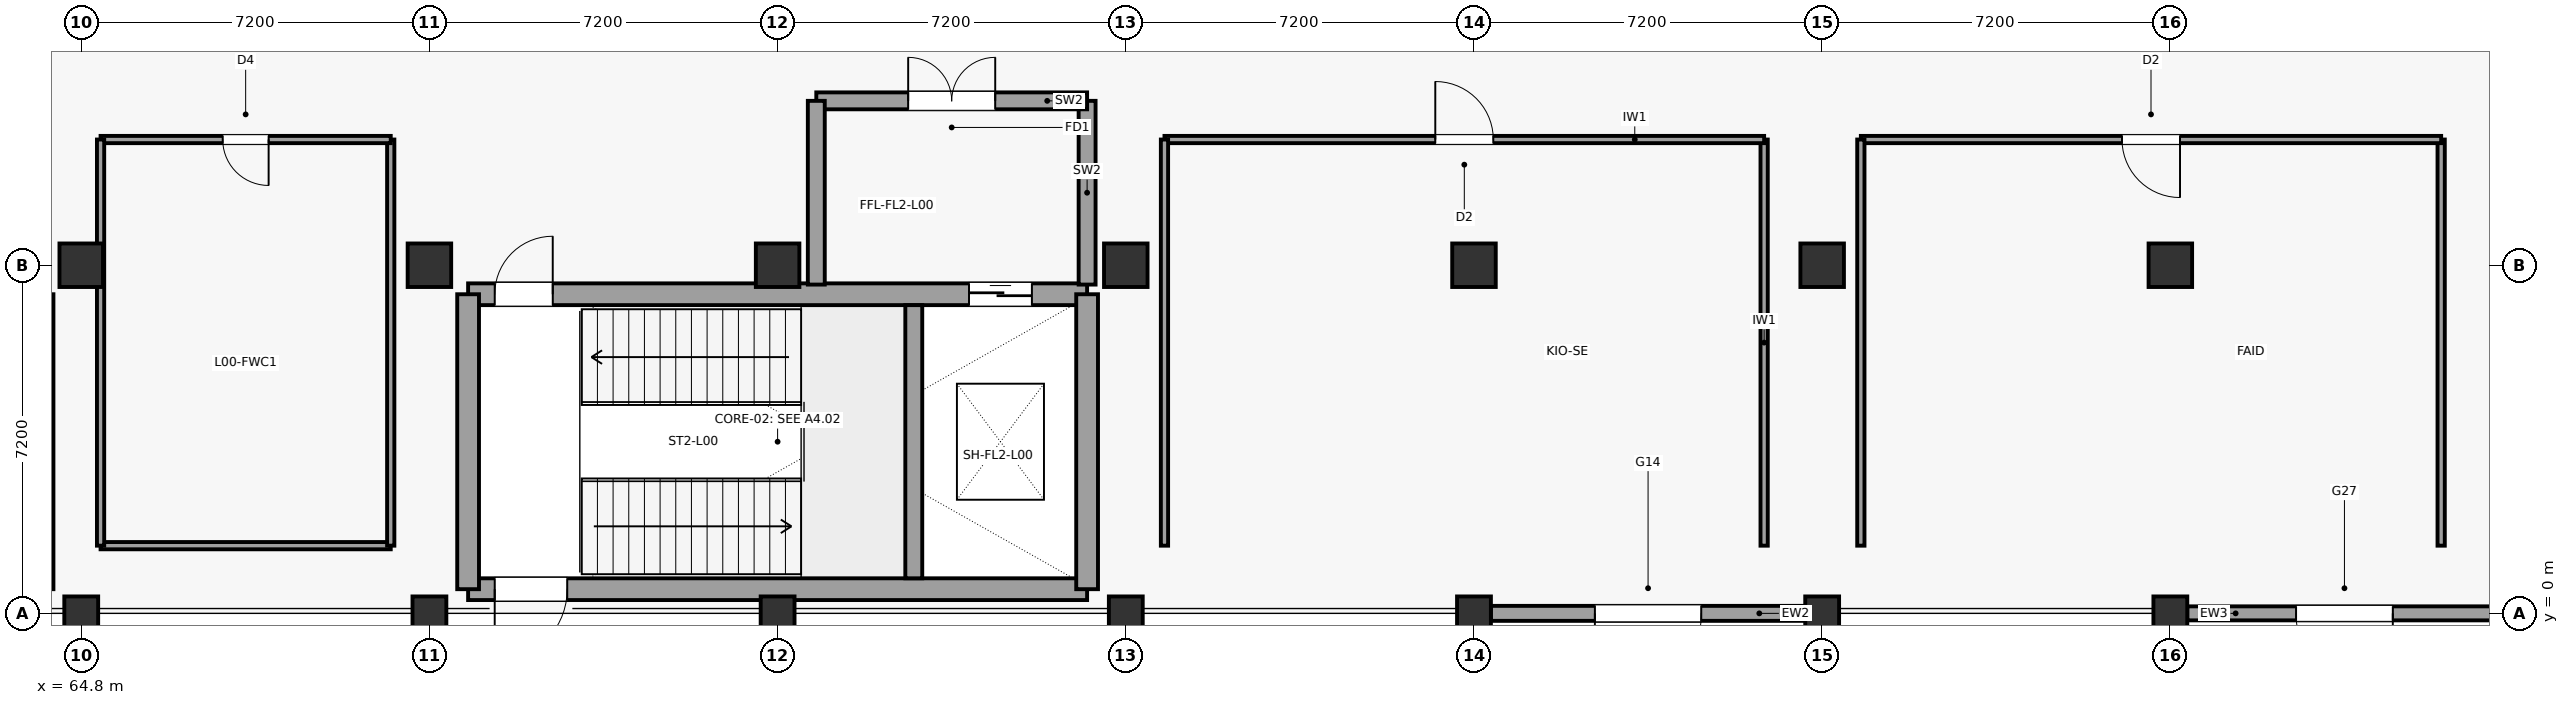
"""IFC4 building model, lengths in metres.
Left out: names, types, materials, properties, quantities, classifications, styles, units other than length and angle.
Written with IfcOpenShell. Run it as: python <this file> out.ifc"""

import sys

from ifc_helpers import new_model, si_unit, direction, frame, frame_2d, origin, origin_2d, place, context, subcontext, project, spatial, rectangle, extrude, element, fill, save


model = new_model("IFC4")
c1 = context("Model", 3, precision=1e-05, world=origin(), true_north=direction((0.0, 1.0)))
c2 = subcontext(c1, "Body", "Model", "MODEL_VIEW")
j1 = project(units=[si_unit("LENGTHUNIT", "METRE"), si_unit("PLANEANGLEUNIT", "RADIAN")], contexts=[c1])
p1 = place(None, origin())
s1 = spatial("IfcSite", under=j1, at=p1, CompositionType="ELEMENT")
p2 = place(p1, origin())
s2 = spatial("IfcBuilding", under=s1, at=p2, CompositionType="ELEMENT")
p3 = place(p2, origin())
s3 = spatial("IfcBuildingStorey", under=s2, at=p3, CompositionType="ELEMENT", Elevation=0.0)
p4 = place(p3, frame((64.8, 0.0, 0.0), z_axis=(0.0, 0.0, 1.0), x_axis=(1.0, 0.0, 0.0)))
e1 = element("IfcColumn", 1, at=p4, inside=s3, PredefinedType="COLUMN", context=c2, shape_type="SweptSolid", body=[
    extrude(rectangle(XDim=0.7, YDim=0.7, at=origin_2d()), origin(), (0.0, 0.0, 1.0), 5.4),
])
p5 = place(p3, frame((64.8, 7.2, 0.0), z_axis=(0.0, 0.0, 1.0), x_axis=(1.0, 0.0, 0.0)))
e2 = element("IfcColumn", 2, at=p5, inside=s3, PredefinedType="COLUMN", context=c2, shape_type="SweptSolid", body=[
    extrude(rectangle(XDim=0.9, YDim=0.9, at=origin_2d()), origin(), (0.0, 0.0, 1.0), 5.4),
])
p6 = place(p3, frame((72.0, 0.0, 0.0), z_axis=(0.0, 0.0, 1.0), x_axis=(1.0, 0.0, 0.0)))
e3 = element("IfcColumn", 3, at=p6, inside=s3, PredefinedType="COLUMN", context=c2, shape_type="SweptSolid", body=[
    extrude(rectangle(XDim=0.7, YDim=0.7, at=origin_2d()), origin(), (0.0, 0.0, 1.0), 5.4),
])
p7 = place(p3, frame((72.0, 7.2, 0.0), z_axis=(0.0, 0.0, 1.0), x_axis=(1.0, 0.0, 0.0)))
e4 = element("IfcColumn", 4, at=p7, inside=s3, PredefinedType="COLUMN", context=c2, shape_type="SweptSolid", body=[
    extrude(rectangle(XDim=0.9, YDim=0.9, at=origin_2d()), origin(), (0.0, 0.0, 1.0), 5.4),
])
p8 = place(p3, frame((79.2, 0.0, 0.0), z_axis=(0.0, 0.0, 1.0), x_axis=(1.0, 0.0, 0.0)))
e5 = element("IfcColumn", 5, at=p8, inside=s3, PredefinedType="COLUMN", context=c2, shape_type="SweptSolid", body=[
    extrude(rectangle(XDim=0.7, YDim=0.7, at=origin_2d()), origin(), (0.0, 0.0, 1.0), 5.4),
])
p9 = place(p3, frame((79.2, 7.2, 0.0), z_axis=(0.0, 0.0, 1.0), x_axis=(1.0, 0.0, 0.0)))
e6 = element("IfcColumn", 6, at=p9, inside=s3, PredefinedType="COLUMN", context=c2, shape_type="SweptSolid", body=[
    extrude(rectangle(XDim=0.9, YDim=0.9, at=origin_2d()), origin(), (0.0, 0.0, 1.0), 5.4),
])
p10 = place(p3, frame((86.4, 0.0, 0.0), z_axis=(0.0, 0.0, 1.0), x_axis=(1.0, 0.0, 0.0)))
e7 = element("IfcColumn", 7, at=p10, inside=s3, PredefinedType="COLUMN", context=c2, shape_type="SweptSolid", body=[
    extrude(rectangle(XDim=0.7, YDim=0.7, at=origin_2d()), origin(), (0.0, 0.0, 1.0), 5.4),
])
p11 = place(p3, frame((86.4, 7.2, 0.0), z_axis=(0.0, 0.0, 1.0), x_axis=(1.0, 0.0, 0.0)))
e8 = element("IfcColumn", 8, at=p11, inside=s3, PredefinedType="COLUMN", context=c2, shape_type="SweptSolid", body=[
    extrude(rectangle(XDim=0.9, YDim=0.9, at=origin_2d()), origin(), (0.0, 0.0, 1.0), 5.4),
])
p12 = place(p3, frame((93.6, 0.0, 0.0), z_axis=(0.0, 0.0, 1.0), x_axis=(1.0, 0.0, 0.0)))
e9 = element("IfcColumn", 9, at=p12, inside=s3, PredefinedType="COLUMN", context=c2, shape_type="SweptSolid", body=[
    extrude(rectangle(XDim=0.7, YDim=0.7, at=origin_2d()), origin(), (0.0, 0.0, 1.0), 5.4),
])
p13 = place(p3, frame((93.6, 7.2, 0.0), z_axis=(0.0, 0.0, 1.0), x_axis=(1.0, 0.0, 0.0)))
e10 = element("IfcColumn", 10, at=p13, inside=s3, PredefinedType="COLUMN", context=c2, shape_type="SweptSolid", body=[
    extrude(rectangle(XDim=0.9, YDim=0.9, at=origin_2d()), origin(), (0.0, 0.0, 1.0), 5.4),
])
p14 = place(p3, frame((100.8, 0.0, 0.0), z_axis=(0.0, 0.0, 1.0), x_axis=(1.0, 0.0, 0.0)))
e11 = element("IfcColumn", 11, at=p14, inside=s3, PredefinedType="COLUMN", context=c2, shape_type="SweptSolid", body=[
    extrude(rectangle(XDim=0.7, YDim=0.7, at=origin_2d()), origin(), (0.0, 0.0, 1.0), 5.4),
])
p15 = place(p3, frame((100.8, 7.2, 0.0), z_axis=(0.0, 0.0, 1.0), x_axis=(1.0, 0.0, 0.0)))
e12 = element("IfcColumn", 12, at=p15, inside=s3, PredefinedType="COLUMN", context=c2, shape_type="SweptSolid", body=[
    extrude(rectangle(XDim=0.9, YDim=0.9, at=origin_2d()), origin(), (0.0, 0.0, 1.0), 5.4),
])
p16 = place(p3, frame((108.0, 0.0, 0.0), z_axis=(0.0, 0.0, 1.0), x_axis=(1.0, 0.0, 0.0)))
e13 = element("IfcColumn", 13, at=p16, inside=s3, PredefinedType="COLUMN", context=c2, shape_type="SweptSolid", body=[
    extrude(rectangle(XDim=0.7, YDim=0.7, at=origin_2d()), origin(), (0.0, 0.0, 1.0), 5.4),
])
p17 = place(p3, frame((108.0, 7.2, 0.0), z_axis=(0.0, 0.0, 1.0), x_axis=(1.0, 0.0, 0.0)))
e14 = element("IfcColumn", 14, at=p17, inside=s3, PredefinedType="COLUMN", context=c2, shape_type="SweptSolid", body=[
    extrude(rectangle(XDim=0.9, YDim=0.9, at=origin_2d()), origin(), (0.0, 0.0, 1.0), 5.4),
])
p18 = place(p3, frame((72.8, 0.5, 0.0), z_axis=(0.0, 0.0, 1.0), x_axis=(1.0, 0.0, 0.0)))
e15 = element("IfcWall", 15, at=p18, inside=s3, PredefinedType="SHEAR", context=c2, shape_type="SweptSolid", body=[
    extrude(rectangle(XDim=12.8, YDim=0.45, at=frame_2d((6.4, 0.0))), origin(), (0.0, 0.0, 1.0), 5.06),
])
p19 = place(p18, frame((0.55, 0.0, 0.0)))
e16 = element("IfcOpeningElement", 16, at=p19, cuts=e15, PredefinedType="OPENING", context=c2, shape_type="SweptSolid", body=[
    extrude(rectangle(XDim=1.5, YDim=2.25, at=frame_2d((0.75, 1.125))), frame((0.0, 0.235, 0.0), z_axis=(0.0, -1.0, 0.0), x_axis=(1.0, 0.0, 0.0)), (0.0, 0.0, 1.0), 0.47),
])
p20 = place(p3, frame((72.8, 6.6, 0.0), z_axis=(0.0, 0.0, 1.0), x_axis=(1.0, 0.0, 0.0)))
e17 = element("IfcWall", 17, at=p20, inside=s3, PredefinedType="SHEAR", context=c2, shape_type="SweptSolid", body=[
    extrude(rectangle(XDim=12.8, YDim=0.45, at=frame_2d((6.4, 0.0))), origin(), (0.0, 0.0, 1.0), 5.06),
])
p21 = place(p20, frame((0.55, 0.0, 0.0)))
e18 = element("IfcOpeningElement", 18, at=p21, cuts=e17, PredefinedType="OPENING", context=c2, shape_type="SweptSolid", body=[
    extrude(rectangle(XDim=1.2, YDim=2.25, at=frame_2d((0.6, 1.125))), frame((0.0, 0.235, 0.0), z_axis=(0.0, -1.0, 0.0), x_axis=(1.0, 0.0, 0.0)), (0.0, 0.0, 1.0), 0.47),
])
p22 = place(p20, frame((10.358, 0.0, 0.0)))
e19 = element("IfcOpeningElement", 19, at=p22, cuts=e17, PredefinedType="OPENING", context=c2, shape_type="SweptSolid", body=[
    extrude(rectangle(XDim=1.3, YDim=2.25, at=frame_2d((0.65, 1.125))), frame((0.0, 0.235, 0.0), z_axis=(0.0, -1.0, 0.0), x_axis=(1.0, 0.0, 0.0)), (0.0, 0.0, 1.0), 0.47),
])
for number, where, z_axis, x_axis in (
    (20, (72.8, 0.5, 0.0), (0.0, 0.0, 1.0), (0.0, 1.0, 0.0)),
    (21, (85.6, 0.5, 0.0), (0.0, 0.0, 1.0), (0.0, 1.0, 0.0)),
):
    element("IfcWall", number, at=place(p3, frame(where, z_axis=z_axis, x_axis=x_axis)), inside=s3, PredefinedType="SHEAR", context=c2, shape_type="SweptSolid", body=[
        extrude(rectangle(XDim=6.1, YDim=0.45, at=frame_2d((3.05, 0.0))), origin(), (0.0, 0.0, 1.0), 5.06),
    ])
p23 = place(p3, frame((82.016, 0.725, 0.0), z_axis=(0.0, 0.0, 1.0), x_axis=(0.0, 1.0, 0.0)))
e22 = element("IfcWall", 22, at=p23, inside=s3, PredefinedType="SHEAR", context=c2, shape_type="SweptSolid", body=[
    extrude(rectangle(XDim=5.65, YDim=0.35, at=frame_2d((2.825, 0.0))), origin(), (0.0, 0.0, 1.0), 5.06),
])
p24 = place(p3, frame((64.0, 0.5, 0.0), z_axis=(0.0, 0.0, 1.0), x_axis=(0.0, 1.0, 0.0)))
e23 = element("IfcWall", 23, at=p24, inside=s3, PredefinedType="SHEAR", context=c2, shape_type="SweptSolid", body=[
    extrude(rectangle(XDim=6.1, YDim=0.45, at=frame_2d((3.05, 0.0))), origin(), (0.0, 0.0, 1.0), 5.06),
])
p25 = place(p3, frame((93.95, 0.0, 0.0), z_axis=(0.0, 0.0, 1.0), x_axis=(1.0, 0.0, 0.0)))
e24 = element("IfcWall", 24, at=p25, inside=s3, PredefinedType="SOLIDWALL", context=c2, shape_type="SweptSolid", body=[
    extrude(rectangle(XDim=6.5, YDim=0.31, at=frame_2d((3.25, 0.0))), origin(), (0.0, 0.0, 1.0), 4.1),
])
p26 = place(p25, frame((2.15, 0.0, 0.0)))
e25 = element("IfcOpeningElement", 25, at=p26, cuts=e24, PredefinedType="OPENING", context=c2, shape_type="SweptSolid", body=[
    extrude(rectangle(XDim=2.2, YDim=2.5, at=frame_2d((1.1, 1.25))), frame((0.0, 0.165, 0.0), z_axis=(0.0, -1.0, 0.0), x_axis=(1.0, 0.0, 0.0)), (0.0, 0.0, 1.0), 0.33),
])
p27 = place(p3, frame((108.35, 0.0, 0.0), z_axis=(0.0, 0.0, 1.0), x_axis=(1.0, 0.0, 0.0)))
e26 = element("IfcWall", 26, at=p27, inside=s3, PredefinedType="SOLIDWALL", context=c2, shape_type="SweptSolid", body=[
    extrude(rectangle(XDim=6.5, YDim=0.29, at=frame_2d((3.25, 0.0))), origin(), (0.0, 0.0, 1.0), 4.1),
])
p28 = place(p27, frame((2.25, 0.0, 0.0)))
e27 = element("IfcOpeningElement", 27, at=p28, cuts=e26, PredefinedType="OPENING", context=c2, shape_type="SweptSolid", body=[
    extrude(rectangle(XDim=2.0, YDim=2.45, at=frame_2d((1.0, 1.225))), frame((0.0, 0.155, 0.0), z_axis=(0.0, -1.0, 0.0), x_axis=(1.0, 0.0, 0.0)), (0.0, 0.0, 1.0), 0.31),
])
p29 = place(p3, frame((85.6, 6.8, 0.0), z_axis=(0.0, 0.0, 1.0), x_axis=(0.0, 1.0, 0.0)))
e28 = element("IfcWall", 28, at=p29, inside=s3, PredefinedType="SHEAR", context=c2, shape_type="SweptSolid", body=[
    extrude(rectangle(XDim=3.8, YDim=0.35, at=frame_2d((1.9, 0.0))), origin(), (0.0, 0.0, 1.0), 4.1),
])
p30 = place(p3, frame((85.6, 10.6, 0.0), z_axis=(0.0, 0.0, 1.0), x_axis=(-1.0, 0.0, 0.0)))
e29 = element("IfcWall", 29, at=p30, inside=s3, PredefinedType="SHEAR", context=c2, shape_type="SweptSolid", body=[
    extrude(rectangle(XDim=5.6, YDim=0.35, at=frame_2d((2.8, 0.0))), origin(), (0.0, 0.0, 1.0), 4.1),
])
p31 = place(p30, frame((1.9, 0.0, 0.0)))
e30 = element("IfcOpeningElement", 30, at=p31, cuts=e29, PredefinedType="OPENING", context=c2, shape_type="SweptSolid", body=[
    extrude(rectangle(XDim=1.8, YDim=2.3, at=frame_2d((0.9, 1.15))), frame((0.0, 0.185, 0.0), z_axis=(0.0, -1.0, 0.0), x_axis=(1.0, 0.0, 0.0)), (0.0, 0.0, 1.0), 0.37),
])
p32 = place(p3, frame((80.0, 10.6, 0.0), z_axis=(0.0, 0.0, 1.0), x_axis=(0.0, -1.0, 0.0)))
e31 = element("IfcWall", 31, at=p32, inside=s3, PredefinedType="SHEAR", context=c2, shape_type="SweptSolid", body=[
    extrude(rectangle(XDim=3.8, YDim=0.35, at=frame_2d((1.9, 0.0))), origin(), (0.0, 0.0, 1.0), 4.1),
])
p33 = place(p3, frame((99.6, 1.4, 0.0), z_axis=(0.0, 0.0, 1.0), x_axis=(0.0, 1.0, 0.0)))
e32 = element("IfcWall", 32, at=p33, inside=s3, PredefinedType="PARTITIONING", context=c2, shape_type="SweptSolid", body=[
    extrude(rectangle(XDim=8.4, YDim=0.15, at=frame_2d((4.2, 0.0))), origin(), (0.0, 0.0, 1.0), 4.1),
])
p34 = place(p3, frame((99.6, 9.8, 0.0), z_axis=(0.0, 0.0, 1.0), x_axis=(-1.0, 0.0, 0.0)))
e33 = element("IfcWall", 33, at=p34, inside=s3, PredefinedType="PARTITIONING", context=c2, shape_type="SweptSolid", body=[
    extrude(rectangle(XDim=12.4, YDim=0.15, at=frame_2d((6.2, 0.0))), origin(), (0.0, 0.0, 1.0), 4.1),
])
p35 = place(p34, frame((5.6, 0.0, 0.0)))
e34 = element("IfcOpeningElement", 34, at=p35, cuts=e33, PredefinedType="OPENING", context=c2, shape_type="SweptSolid", body=[
    extrude(rectangle(XDim=1.2, YDim=2.2, at=frame_2d((0.6, 1.1))), frame((0.0, 0.085, 0.0), z_axis=(0.0, -1.0, 0.0), x_axis=(1.0, 0.0, 0.0)), (0.0, 0.0, 1.0), 0.17),
])
for number, where, z_axis, x_axis in (
    (35, (87.2, 9.8, 0.0), (0.0, 0.0, 1.0), (0.0, -1.0, 0.0)),
    (36, (113.6, 1.4, 0.0), (0.0, 0.0, 1.0), (0.0, 1.0, 0.0)),
):
    element("IfcWall", number, at=place(p3, frame(where, z_axis=z_axis, x_axis=x_axis)), inside=s3, PredefinedType="PARTITIONING", context=c2, shape_type="SweptSolid", body=[
        extrude(rectangle(XDim=8.4, YDim=0.15, at=frame_2d((4.2, 0.0))), origin(), (0.0, 0.0, 1.0), 4.1),
    ])
p36 = place(p3, frame((113.6, 9.8, 0.0), z_axis=(0.0, 0.0, 1.0), x_axis=(-1.0, 0.0, 0.0)))
e37 = element("IfcWall", 37, at=p36, inside=s3, PredefinedType="PARTITIONING", context=c2, shape_type="SweptSolid", body=[
    extrude(rectangle(XDim=12.0, YDim=0.15, at=frame_2d((6.0, 0.0))), origin(), (0.0, 0.0, 1.0), 4.1),
])
p37 = place(p36, frame((5.4, 0.0, 0.0)))
e38 = element("IfcOpeningElement", 38, at=p37, cuts=e37, PredefinedType="OPENING", context=c2, shape_type="SweptSolid", body=[
    extrude(rectangle(XDim=1.2, YDim=2.2, at=frame_2d((0.6, 1.1))), frame((0.0, 0.085, 0.0), z_axis=(0.0, -1.0, 0.0), x_axis=(1.0, 0.0, 0.0)), (0.0, 0.0, 1.0), 0.17),
])
p38 = place(p3, frame((101.6, 9.8, 0.0), z_axis=(0.0, 0.0, 1.0), x_axis=(0.0, -1.0, 0.0)))
e39 = element("IfcWall", 39, at=p38, inside=s3, PredefinedType="PARTITIONING", context=c2, shape_type="SweptSolid", body=[
    extrude(rectangle(XDim=8.4, YDim=0.15, at=frame_2d((4.2, 0.0))), origin(), (0.0, 0.0, 1.0), 4.1),
])
p39 = place(p3, frame((65.2, 1.4, 0.0), z_axis=(0.0, 0.0, 1.0), x_axis=(1.0, 0.0, 0.0)))
e40 = element("IfcWall", 40, at=p39, inside=s3, PredefinedType="PARTITIONING", context=c2, shape_type="SweptSolid", body=[
    extrude(rectangle(XDim=6.0, YDim=0.15, at=frame_2d((3.0, 0.0))), origin(), (0.0, 0.0, 1.0), 4.1),
])
p40 = place(p3, frame((71.2, 1.4, 0.0), z_axis=(0.0, 0.0, 1.0), x_axis=(0.0, 1.0, 0.0)))
e41 = element("IfcWall", 41, at=p40, inside=s3, PredefinedType="PARTITIONING", context=c2, shape_type="SweptSolid", body=[
    extrude(rectangle(XDim=8.4, YDim=0.15, at=frame_2d((4.2, 0.0))), origin(), (0.0, 0.0, 1.0), 4.1),
])
p41 = place(p3, frame((71.2, 9.8, 0.0), z_axis=(0.0, 0.0, 1.0), x_axis=(-1.0, 0.0, 0.0)))
e42 = element("IfcWall", 42, at=p41, inside=s3, PredefinedType="PARTITIONING", context=c2, shape_type="SweptSolid", body=[
    extrude(rectangle(XDim=6.0, YDim=0.15, at=frame_2d((3.0, 0.0))), origin(), (0.0, 0.0, 1.0), 4.1),
])
p42 = place(p41, frame((2.525, 0.0, 0.0)))
e43 = element("IfcOpeningElement", 43, at=p42, cuts=e42, PredefinedType="OPENING", context=c2, shape_type="SweptSolid", body=[
    extrude(rectangle(XDim=0.95, YDim=2.15, at=frame_2d((0.475, 1.075))), frame((0.0, 0.085, 0.0), z_axis=(0.0, -1.0, 0.0), x_axis=(1.0, 0.0, 0.0)), (0.0, 0.0, 1.0), 0.17),
])
p43 = place(p3, frame((65.2, 9.8, 0.0), z_axis=(0.0, 0.0, 1.0), x_axis=(0.0, -1.0, 0.0)))
e44 = element("IfcWall", 44, at=p43, inside=s3, PredefinedType="PARTITIONING", context=c2, shape_type="SweptSolid", body=[
    extrude(rectangle(XDim=8.4, YDim=0.15, at=frame_2d((4.2, 0.0))), origin(), (0.0, 0.0, 1.0), 4.1),
])
p44 = place(p26, frame((2.2, 0.0, 0.0), z_axis=(0.0, 0.0, 1.0), x_axis=(-1.0, 0.0, 0.0)))
e45 = element("IfcDoor", 45, at=p44, inside=s3, OperationType="SINGLE_SWING_LEFT", PredefinedType="DOOR", context=c2, shape_type="SweptSolid", body=[
    extrude(rectangle(XDim=2.2, YDim=2.5, at=frame_2d((1.1, 1.25))), frame((0.0, 0.025, 0.0), z_axis=(0.0, -1.0, 0.0), x_axis=(1.0, 0.0, 0.0)), (0.0, 0.0, 1.0), 0.05),
])
fill(e25, e45)
p45 = place(p28, frame((2.0, 0.0, 0.0), z_axis=(0.0, 0.0, 1.0), x_axis=(-1.0, 0.0, 0.0)))
e46 = element("IfcDoor", 46, at=p45, inside=s3, OperationType="SINGLE_SWING_RIGHT", PredefinedType="DOOR", context=c2, shape_type="SweptSolid", body=[
    extrude(rectangle(XDim=2.0, YDim=2.45, at=frame_2d((1.0, 1.225))), frame((0.0, 0.025, 0.0), z_axis=(0.0, -1.0, 0.0), x_axis=(1.0, 0.0, 0.0)), (0.0, 0.0, 1.0), 0.05),
])
fill(e27, e46)
p46 = place(p21, origin())
e47 = element("IfcDoor", 47, at=p46, inside=s3, OperationType="SINGLE_SWING_RIGHT", PredefinedType="DOOR", context=c2, shape_type="SweptSolid", body=[
    extrude(rectangle(XDim=1.2, YDim=2.25, at=frame_2d((0.6, 1.125))), frame((0.0, 0.025, 0.0), z_axis=(0.0, -1.0, 0.0), x_axis=(1.0, 0.0, 0.0)), (0.0, 0.0, 1.0), 0.05),
])
fill(e18, e47)
p47 = place(p19, frame((1.5, 0.0, 0.0), z_axis=(0.0, 0.0, 1.0), x_axis=(-1.0, 0.0, 0.0)))
e48 = element("IfcDoor", 48, at=p47, inside=s3, OperationType="SINGLE_SWING_LEFT", PredefinedType="DOOR", context=c2, shape_type="SweptSolid", body=[
    extrude(rectangle(XDim=1.5, YDim=2.25, at=frame_2d((0.75, 1.125))), frame((0.0, 0.025, 0.0), z_axis=(0.0, -1.0, 0.0), x_axis=(1.0, 0.0, 0.0)), (0.0, 0.0, 1.0), 0.05),
])
fill(e16, e48)
p48 = place(p22, origin())
e49 = element("IfcDoor", 49, at=p48, inside=s3, OperationType="SLIDING_TO_RIGHT", PredefinedType="DOOR", context=c2, shape_type="SweptSolid", body=[
    extrude(rectangle(XDim=1.3, YDim=2.25, at=frame_2d((0.65, 1.125))), frame((0.0, 0.025, 0.0), z_axis=(0.0, -1.0, 0.0), x_axis=(1.0, 0.0, 0.0)), (0.0, 0.0, 1.0), 0.05),
])
fill(e19, e49)
p49 = place(p31, frame((1.8, 0.0, 0.0), z_axis=(0.0, 0.0, 1.0), x_axis=(-1.0, 0.0, 0.0)))
e50 = element("IfcDoor", 50, at=p49, inside=s3, OperationType="DOUBLE_DOOR_SINGLE_SWING", PredefinedType="DOOR", context=c2, shape_type="SweptSolid", body=[
    extrude(rectangle(XDim=1.8, YDim=2.3, at=frame_2d((0.9, 1.15))), frame((0.0, 0.025, 0.0), z_axis=(0.0, -1.0, 0.0), x_axis=(1.0, 0.0, 0.0)), (0.0, 0.0, 1.0), 0.05),
])
fill(e30, e50)
p50 = place(p35, frame((1.2, 0.0, 0.0), z_axis=(0.0, 0.0, 1.0), x_axis=(-1.0, 0.0, 0.0)))
e51 = element("IfcDoor", 51, at=p50, inside=s3, OperationType="SINGLE_SWING_RIGHT", PredefinedType="DOOR", context=c2, shape_type="SweptSolid", body=[
    extrude(rectangle(XDim=1.2, YDim=2.2, at=frame_2d((0.6, 1.1))), frame((0.0, 0.025, 0.0), z_axis=(0.0, -1.0, 0.0), x_axis=(1.0, 0.0, 0.0)), (0.0, 0.0, 1.0), 0.05),
])
fill(e34, e51)
p51 = place(p37, origin())
e52 = element("IfcDoor", 52, at=p51, inside=s3, OperationType="SINGLE_SWING_LEFT", PredefinedType="DOOR", context=c2, shape_type="SweptSolid", body=[
    extrude(rectangle(XDim=1.2, YDim=2.2, at=frame_2d((0.6, 1.1))), frame((0.0, 0.025, 0.0), z_axis=(0.0, -1.0, 0.0), x_axis=(1.0, 0.0, 0.0)), (0.0, 0.0, 1.0), 0.05),
])
fill(e38, e52)
p52 = place(p42, origin())
e53 = element("IfcDoor", 53, at=p52, inside=s3, OperationType="SINGLE_SWING_LEFT", PredefinedType="DOOR", context=c2, shape_type="SweptSolid", body=[
    extrude(rectangle(XDim=0.95, YDim=2.15, at=frame_2d((0.475, 1.075))), frame((0.0, 0.025, 0.0), z_axis=(0.0, -1.0, 0.0), x_axis=(1.0, 0.0, 0.0)), (0.0, 0.0, 1.0), 0.05),
])
fill(e43, e53)
save(model, sys.argv[1])
